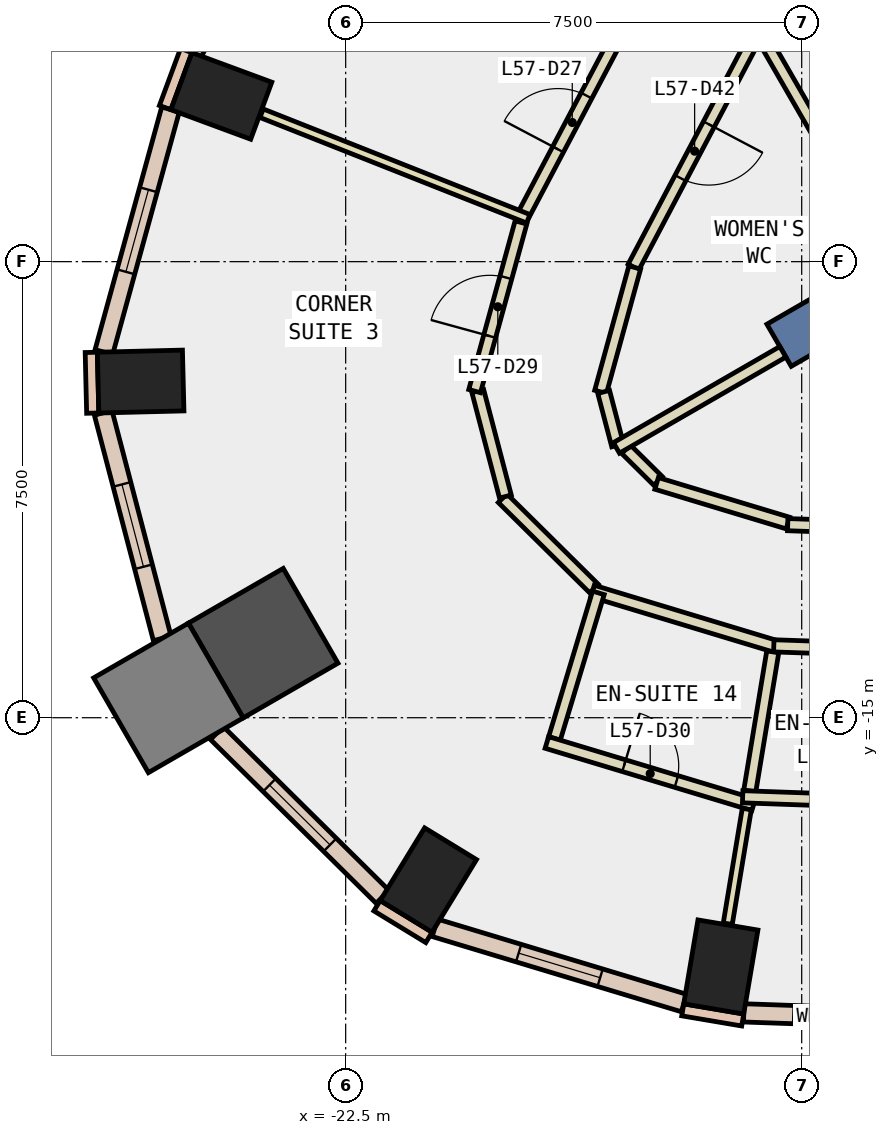
"""IFC4 building model, lengths in metres.
Left out: names, types, materials, properties, quantities, classifications, styles, units other than length and angle.
Written with IfcOpenShell. Run it as: python <this file> out.ifc"""

import sys

from ifc_helpers import new_model, si_unit, direction, frame, frame_2d, origin, origin_2d, place, context, subcontext, project, spatial, rectangle, extrude, element, fill, save


model = new_model("IFC4")
c1 = context("Model", 3, precision=1e-05, world=origin(), true_north=direction((0.0, 1.0)))
c2 = subcontext(c1, "Body", "Model", "MODEL_VIEW")
j1 = project(units=[si_unit("LENGTHUNIT", "METRE"), si_unit("PLANEANGLEUNIT", "RADIAN")], contexts=[c1])
p1 = place(None, origin())
s1 = spatial("IfcSite", under=j1, at=p1, CompositionType="ELEMENT")
p2 = place(p1, origin())
s2 = spatial("IfcBuilding", under=s1, at=p2, CompositionType="ELEMENT")
p3 = place(p2, frame((0.0, 0.0, 252.2)))
s3 = spatial("IfcBuildingStorey", under=s2, at=p3, CompositionType="ELEMENT", Elevation=252.2)
for number, where, z_axis, x_axis in (
    (1, (-16.33, -19.099, -0.34), (0.0, 0.0, 1.0), (-0.986, 0.167, 0.0)),
    (2, (-24.545, -4.775, -0.34), (0.0, 0.0, 1.0), (0.347, 0.938, 0.0)),
    (3, (-25.872, -9.472, -0.34), (0.0, 0.0, 1.0), (-0.025, 1.0, 0.0)),
):
    element("IfcColumn", number, at=place(p3, frame(where, z_axis=z_axis, x_axis=x_axis)), inside=s3, PredefinedType="COLUMN", context=c2, shape_type="SweptSolid", body=[
        extrude(rectangle(XDim=1.0, YDim=1.4, at=origin_2d()), origin(), (0.0, 0.0, 1.0), 3.6),
    ])
p4 = place(p3, frame((-23.856, -13.774, -0.34), z_axis=(0.0, 0.0, 1.0), x_axis=(0.866025403784, 0.5, 0.0)))
e4 = element("IfcColumn", 4, at=p4, inside=s3, PredefinedType="COLUMN", context=c2, shape_type="SweptSolid", body=[
    extrude(rectangle(XDim=1.8, YDim=1.8, at=origin_2d()), origin(), (0.0, 0.0, 1.0), 3.6),
])
p5 = place(p3, frame((-21.14, -17.67, -0.34), z_axis=(0.0, 0.0, 1.0), x_axis=(-0.853341581839, 0.521352227103, 0.0)))
e5 = element("IfcColumn", 5, at=p5, inside=s3, PredefinedType="COLUMN", context=c2, shape_type="SweptSolid", body=[
    extrude(rectangle(XDim=1.0, YDim=1.4, at=origin_2d()), origin(), (0.0, 0.0, 1.0), 3.6),
])
p6 = place(p3, frame((-25.415, -14.674, -0.34), z_axis=(0.0, 0.0, 1.0), x_axis=(0.866025403784, 0.5, 0.0)))
e6 = element("IfcColumn", 6, at=p6, inside=s3, PredefinedType="COLUMN", context=c2, shape_type="SweptSolid", body=[
    extrude(rectangle(XDim=1.8, YDim=1.8, at=origin_2d()), origin(), (0.0, 0.0, 1.0), 3.6),
])
p7 = place(p3, frame((-7.578, -4.375, -0.34), z_axis=(0.0, 0.0, 1.0), x_axis=(-0.866024315419, -0.5000018851, 0.0)))
e7 = element("IfcWall", 7, at=p7, inside=s3, PredefinedType="SHEAR", context=c2, shape_type="SweptSolid", body=[
    extrude(rectangle(XDim=9.0, YDim=0.8, at=frame_2d((4.5, 0.0))), origin(), (0.0, 0.0, 1.0), 3.6),
])
p8 = place(p3, frame((-25.122, -4.029, 0.0), z_axis=(0.0, 0.0, 1.0), x_axis=(-0.346892928577, -0.937904737222, 0.0)))
e8 = element("IfcWall", 8, at=p8, inside=s3, PredefinedType="STANDARD", context=c2, shape_type="SweptSolid", body=[
    extrude(rectangle(XDim=1.0, YDim=0.2, at=frame_2d((0.5, 0.0))), origin(), (0.0, 0.0, 1.0), 3.26),
])
p9 = place(p3, frame((-16.956, -19.804, 0.0), z_axis=(0.0, 0.0, 1.0), x_axis=(0.985961725342, -0.166971483074, 0.0)))
e9 = element("IfcWall", 9, at=p9, inside=s3, PredefinedType="STANDARD", context=c2, shape_type="SweptSolid", body=[
    extrude(rectangle(XDim=1.0, YDim=0.2, at=frame_2d((0.5, 0.0))), origin(), (0.0, 0.0, 1.0), 3.26),
])
p10 = place(p3, frame((-26.684, -8.992, 0.0), z_axis=(0.0, 0.0, 1.0), x_axis=(0.024186470916, -0.999707464524, 0.0)))
e10 = element("IfcWall", 10, at=p10, inside=s3, PredefinedType="STANDARD", context=c2, shape_type="SweptSolid", body=[
    extrude(rectangle(XDim=0.999, YDim=0.2, at=frame_2d((0.5, 0.0))), origin(), (0.0, 0.0, 1.0), 3.26),
])
p11 = place(p3, frame((-21.984, -18.092, 0.0), z_axis=(0.0, 0.0, 1.0), x_axis=(0.853679739553, -0.520798331677, 0.0)))
e11 = element("IfcWall", 11, at=p11, inside=s3, PredefinedType="STANDARD", context=c2, shape_type="SweptSolid", body=[
    extrude(rectangle(XDim=1.0, YDim=0.2, at=frame_2d((0.5, 0.0))), origin(), (0.0, 0.0, 1.0), 3.26),
])
p12 = place(p3, frame((-15.952, -19.854, 0.0), z_axis=(0.0, 0.0, 1.0), x_axis=(0.999387577449, -0.034992428331, 0.0)))
e12 = element("IfcWall", 12, at=p12, inside=s3, PredefinedType="STANDARD", context=c2, shape_type="SweptSolid", body=[
    extrude(rectangle(XDim=7.661, YDim=0.3, at=frame_2d((3.83, 0.0))), origin(), (0.0, 0.0, 1.0), 3.26),
])
p13 = place(p12, frame((0.815, 0.0, 0.9)))
e13 = element("IfcOpeningElement", 13, at=p13, cuts=e12, PredefinedType="OPENING", context=c2, shape_type="SweptSolid", body=[
    extrude(rectangle(XDim=2.2, YDim=2.0, at=frame_2d((1.1, 1.0))), frame((0.0, 0.16, 0.0), z_axis=(0.0, -1.0, 0.0), x_axis=(1.0, 0.0, 0.0)), (0.0, 0.0, 1.0), 0.32),
])
p14 = place(p12, frame((4.646, 0.0, 0.9)))
e14 = element("IfcOpeningElement", 14, at=p14, cuts=e12, PredefinedType="OPENING", context=c2, shape_type="SweptSolid", body=[
    extrude(rectangle(XDim=2.2, YDim=2.0, at=frame_2d((1.1, 1.0))), frame((0.0, 0.16, 0.0), z_axis=(0.0, -1.0, 0.0), x_axis=(1.0, 0.0, 0.0)), (0.0, 0.0, 1.0), 0.32),
])
p15 = place(p3, frame((-22.381, 0.916, 0.0), z_axis=(0.0, 0.0, 1.0), x_axis=(-0.466663589714, -0.884434900959, 0.0)))
e15 = element("IfcWall", 15, at=p15, inside=s3, PredefinedType="STANDARD", context=c2, shape_type="SweptSolid", body=[
    extrude(rectangle(XDim=5.638, YDim=0.3, at=frame_2d((2.819, 0.0))), origin(), (0.0, 0.0, 1.0), 3.26),
])
p16 = place(p15, frame((0.459, 0.0, 0.9)))
e16 = element("IfcOpeningElement", 16, at=p16, cuts=e15, PredefinedType="OPENING", context=c2, shape_type="SweptSolid", body=[
    extrude(rectangle(XDim=1.9, YDim=2.0, at=frame_2d((0.95, 1.0))), frame((0.0, 0.16, 0.0), z_axis=(0.0, -1.0, 0.0), x_axis=(1.0, 0.0, 0.0)), (0.0, 0.0, 1.0), 0.32),
])
p17 = place(p15, frame((3.278, 0.0, 0.9)))
e17 = element("IfcOpeningElement", 17, at=p17, cuts=e15, PredefinedType="OPENING", context=c2, shape_type="SweptSolid", body=[
    extrude(rectangle(XDim=1.9, YDim=2.0, at=frame_2d((0.95, 1.0))), frame((0.0, 0.16, 0.0), z_axis=(0.0, -1.0, 0.0), x_axis=(1.0, 0.0, 0.0)), (0.0, 0.0, 1.0), 0.32),
])
p18 = place(p3, frame((-25.381, -4.998, 0.0), z_axis=(0.0, 0.0, 1.0), x_axis=(-0.264924661919, -0.964269113633, 0.0)))
e18 = element("IfcWall", 18, at=p18, inside=s3, PredefinedType="STANDARD", context=c2, shape_type="SweptSolid", body=[
    extrude(rectangle(XDim=4.137, YDim=0.3, at=frame_2d((2.068, 0.0))), origin(), (0.0, 0.0, 1.0), 3.26),
])
p19 = place(p18, frame((1.368, 0.0, 0.9)))
e19 = element("IfcOpeningElement", 19, at=p19, cuts=e18, PredefinedType="OPENING", context=c2, shape_type="SweptSolid", body=[
    extrude(rectangle(XDim=1.4, YDim=2.0, at=frame_2d((0.7, 1.0))), frame((0.0, 0.16, 0.0), z_axis=(0.0, -1.0, 0.0), x_axis=(1.0, 0.0, 0.0)), (0.0, 0.0, 1.0), 0.32),
])
p20 = place(p3, frame((-26.488, -9.986, 0.0), z_axis=(0.0, 0.0, 1.0), x_axis=(0.253248721632, -0.967401201669, 0.0)))
e20 = element("IfcWall", 20, at=p20, inside=s3, PredefinedType="STANDARD", context=c2, shape_type="SweptSolid", body=[
    extrude(rectangle(XDim=3.834, YDim=0.3, at=frame_2d((1.917, 0.0))), origin(), (0.0, 0.0, 1.0), 3.26),
])
p21 = place(p20, frame((1.217, 0.0, 0.9)))
e21 = element("IfcOpeningElement", 21, at=p21, cuts=e20, PredefinedType="OPENING", context=c2, shape_type="SweptSolid", body=[
    extrude(rectangle(XDim=1.4, YDim=2.0, at=frame_2d((0.7, 1.0))), frame((0.0, 0.16, 0.0), z_axis=(0.0, -1.0, 0.0), x_axis=(1.0, 0.0, 0.0)), (0.0, 0.0, 1.0), 0.32),
])
p22 = place(p3, frame((-24.618, -15.252, 0.0), z_axis=(0.0, 0.0, 1.0), x_axis=(0.71110935557, -0.703081420904, 0.0)))
e22 = element("IfcWall", 22, at=p22, inside=s3, PredefinedType="STANDARD", context=c2, shape_type="SweptSolid", body=[
    extrude(rectangle(XDim=3.832, YDim=0.3, at=frame_2d((1.916, 0.0))), origin(), (0.0, 0.0, 1.0), 3.26),
])
p23 = place(p22, frame((1.216, 0.0, 0.9)))
e23 = element("IfcOpeningElement", 23, at=p23, cuts=e22, PredefinedType="OPENING", context=c2, shape_type="SweptSolid", body=[
    extrude(rectangle(XDim=1.4, YDim=2.0, at=frame_2d((0.7, 1.0))), frame((0.0, 0.16, 0.0), z_axis=(0.0, -1.0, 0.0), x_axis=(1.0, 0.0, 0.0)), (0.0, 0.0, 1.0), 0.32),
])
p24 = place(p3, frame((-21.034, -18.455, 0.0), z_axis=(0.0, 0.0, 1.0), x_axis=(0.957346168713, -0.288943442997, 0.0)))
e24 = element("IfcWall", 24, at=p24, inside=s3, PredefinedType="STANDARD", context=c2, shape_type="SweptSolid", body=[
    extrude(rectangle(XDim=4.281, YDim=0.3, at=frame_2d((2.14, 0.0))), origin(), (0.0, 0.0, 1.0), 3.26),
])
p25 = place(p24, frame((1.44, 0.0, 0.9)))
e25 = element("IfcOpeningElement", 25, at=p25, cuts=e24, PredefinedType="OPENING", context=c2, shape_type="SweptSolid", body=[
    extrude(rectangle(XDim=1.4, YDim=2.0, at=frame_2d((0.7, 1.0))), frame((0.0, 0.16, 0.0), z_axis=(0.0, -1.0, 0.0), x_axis=(1.0, 0.0, 0.0)), (0.0, 0.0, 1.0), 0.32),
])
p26 = place(p3, frame((-15.756, -3.779, 0.0), z_axis=(0.0, 0.0, 1.0), x_axis=(-0.46672043873, -0.884404902786, 0.0)))
e26 = element("IfcWall", 26, at=p26, inside=s3, PredefinedType="PARTITIONING", context=c2, shape_type="SweptSolid", body=[
    extrude(rectangle(XDim=4.307, YDim=0.2, at=frame_2d((2.153, 0.0))), origin(), (0.0, 0.0, 1.0), 3.26),
])
p27 = place(p26, frame((1.653, 0.0, 0.0)))
e27 = element("IfcOpeningElement", 27, at=p27, cuts=e26, PredefinedType="OPENING", context=c2, shape_type="SweptSolid", body=[
    extrude(rectangle(XDim=1.0, YDim=2.1, at=frame_2d((0.5, 1.05))), frame((0.0, 0.11, 0.0), z_axis=(0.0, -1.0, 0.0), x_axis=(1.0, 0.0, 0.0)), (0.0, 0.0, 1.0), 0.22),
])
p28 = place(p3, frame((-17.746, -7.596, 0.0), z_axis=(0.0, 0.0, 1.0), x_axis=(-0.264859637197, -0.96428697626, 0.0)))
e28 = element("IfcWall", 28, at=p28, inside=s3, PredefinedType="PARTITIONING", context=c2, shape_type="SweptSolid", body=[
    extrude(rectangle(XDim=2.122, YDim=0.2, at=frame_2d((1.061, 0.0))), origin(), (0.0, 0.0, 1.0), 3.26),
])
p29 = place(p3, frame((-18.257, -9.642, 0.0), z_axis=(0.0, 0.0, 1.0), x_axis=(0.253407342366, -0.967359663639, 0.0)))
e29 = element("IfcWall", 29, at=p29, inside=s3, PredefinedType="PARTITIONING", context=c2, shape_type="SweptSolid", body=[
    extrude(rectangle(XDim=0.907, YDim=0.2, at=frame_2d((0.454, 0.0))), origin(), (0.0, 0.0, 1.0), 3.26),
])
p30 = place(p3, frame((-17.89, -10.584, 0.0), z_axis=(0.0, 0.0, 1.0), x_axis=(0.711042348586, -0.70314918653, 0.0)))
e30 = element("IfcWall", 30, at=p30, inside=s3, PredefinedType="PARTITIONING", context=c2, shape_type="SweptSolid", body=[
    extrude(rectangle(XDim=0.742, YDim=0.2, at=frame_2d((0.371, 0.0))), origin(), (0.0, 0.0, 1.0), 3.26),
])
p31 = place(p3, frame((-17.386, -11.147, 0.0), z_axis=(0.0, 0.0, 1.0), x_axis=(0.957321496956, -0.289025174451, 0.0)))
e31 = element("IfcWall", 31, at=p31, inside=s3, PredefinedType="PARTITIONING", context=c2, shape_type="SweptSolid", body=[
    extrude(rectangle(XDim=2.256, YDim=0.2, at=frame_2d((1.128, 0.0))), origin(), (0.0, 0.0, 1.0), 3.26),
])
p32 = place(p3, frame((-15.23, -11.825, 0.0), z_axis=(0.0, 0.0, 1.0), x_axis=(0.999397560436, -0.0347061406, 0.0)))
e32 = element("IfcWall", 32, at=p32, inside=s3, PredefinedType="PARTITIONING", context=c2, shape_type="SweptSolid", body=[
    extrude(rectangle(XDim=4.207, YDim=0.2, at=frame_2d((2.103, 0.0))), origin(), (0.0, 0.0, 1.0), 3.26),
])
p33 = place(p32, frame((1.603, 0.0, 0.0)))
e33 = element("IfcOpeningElement", 33, at=p33, cuts=e32, PredefinedType="OPENING", context=c2, shape_type="SweptSolid", body=[
    extrude(rectangle(XDim=1.0, YDim=2.1, at=frame_2d((0.5, 1.05))), frame((0.0, 0.11, 0.0), z_axis=(0.0, -1.0, 0.0), x_axis=(1.0, 0.0, 0.0)), (0.0, 0.0, 1.0), 0.22),
])
p34 = place(p3, frame((-19.602, -6.781, 0.0), z_axis=(0.0, 0.0, 1.0), x_axis=(0.466827780692, 0.884348247679, 0.0)))
e34 = element("IfcWall", 34, at=p34, inside=s3, PredefinedType="PARTITIONING", context=c2, shape_type="SweptSolid", body=[
    extrude(rectangle(XDim=3.451, YDim=0.2, at=frame_2d((1.726, 0.0))), origin(), (0.0, 0.0, 1.0), 3.26),
])
p35 = place(p34, frame((1.275, 0.0, 0.0)))
e35 = element("IfcOpeningElement", 35, at=p35, cuts=e34, PredefinedType="OPENING", context=c2, shape_type="SweptSolid", body=[
    extrude(rectangle(XDim=1.0, YDim=2.1, at=frame_2d((0.5, 1.05))), frame((0.0, 0.11, 0.0), z_axis=(0.0, -1.0, 0.0), x_axis=(1.0, 0.0, 0.0)), (0.0, 0.0, 1.0), 0.22),
])
p36 = place(p3, frame((-18.415, -12.877, 0.0), z_axis=(0.0, 0.0, 1.0), x_axis=(-0.711078065077, 0.70311306727, 0.0)))
e36 = element("IfcWall", 36, at=p36, inside=s3, PredefinedType="PARTITIONING", context=c2, shape_type="SweptSolid", body=[
    extrude(rectangle(XDim=2.115, YDim=0.2, at=frame_2d((1.058, 0.0))), origin(), (0.0, 0.0, 1.0), 3.26),
])
p37 = place(p3, frame((-19.873, -11.363, 0.0), z_axis=(0.0, 0.0, 1.0), x_axis=(-0.253192482031, 0.967415922467, 0.0)))
e37 = element("IfcWall", 37, at=p37, inside=s3, PredefinedType="PARTITIONING", context=c2, shape_type="SweptSolid", body=[
    extrude(rectangle(XDim=1.792, YDim=0.2, at=frame_2d((0.896, 0.0))), origin(), (0.0, 0.0, 1.0), 3.26),
])
p38 = place(p3, frame((-20.379, -9.629, 0.0), z_axis=(0.0, 0.0, 1.0), x_axis=(0.26487636938, 0.964282380293, 0.0)))
e38 = element("IfcWall", 38, at=p38, inside=s3, PredefinedType="PARTITIONING", context=c2, shape_type="SweptSolid", body=[
    extrude(rectangle(XDim=2.877, YDim=0.2, at=frame_2d((1.438, 0.0))), origin(), (0.0, 0.0, 1.0), 3.26),
])
p39 = place(p38, frame((0.938, 0.0, 0.0)))
e39 = element("IfcOpeningElement", 39, at=p39, cuts=e38, PredefinedType="OPENING", context=c2, shape_type="SweptSolid", body=[
    extrude(rectangle(XDim=1.0, YDim=2.1, at=frame_2d((0.5, 1.05))), frame((0.0, 0.11, 0.0), z_axis=(0.0, -1.0, 0.0), x_axis=(1.0, 0.0, 0.0)), (0.0, 0.0, 1.0), 0.22),
])
p40 = place(p3, frame((-15.363, -13.847, 0.0), z_axis=(0.0, 0.0, 1.0), x_axis=(-0.957320969561, 0.289026921303, 0.0)))
e40 = element("IfcWall", 40, at=p40, inside=s3, PredefinedType="PARTITIONING", context=c2, shape_type="SweptSolid", body=[
    extrude(rectangle(XDim=3.214, YDim=0.2, at=frame_2d((1.607, 0.0))), origin(), (0.0, 0.0, 1.0), 3.26),
])
p41 = place(p3, frame((-12.961, -13.905, 0.0), z_axis=(0.0, 0.0, 1.0), x_axis=(-0.999395279268, 0.034771766949, 0.0)))
e41 = element("IfcWall", 41, at=p41, inside=s3, PredefinedType="PARTITIONING", context=c2, shape_type="SweptSolid", body=[
    extrude(rectangle(XDim=2.5, YDim=0.2, at=frame_2d((1.25, 0.0))), origin(), (0.0, 0.0, 1.0), 3.26),
])
p42 = place(p3, frame((-13.58, -7.379, 0.0), z_axis=(0.0, 0.0, 1.0), x_axis=(-0.499916403993, 0.866073662582, 0.0)))
e42 = element("IfcWall", 42, at=p42, inside=s3, PredefinedType="PARTITIONING", context=c2, shape_type="SweptSolid", body=[
    extrude(rectangle(XDim=4.359, YDim=0.2, at=frame_2d((2.179, 0.0))), origin(), (0.0, 0.0, 1.0), 3.26),
])
p43 = place(p3, frame((-15.31, -8.983, 0.0), z_axis=(0.0, 0.0, 1.0), x_axis=(-0.866047943894, -0.499960957353, 0.0)))
e43 = element("IfcWall", 43, at=p43, inside=s3, PredefinedType="PARTITIONING", context=c2, shape_type="SweptSolid", body=[
    extrude(rectangle(XDim=3.16, YDim=0.2, at=frame_2d((1.58, 0.0))), origin(), (0.0, 0.0, 1.0), 3.26),
])
p44 = place(p3, frame((-19.497, -6.795, 0.0), z_axis=(0.0, 0.0, 1.0), x_axis=(-0.929826906887, 0.367997178289, 0.0)))
e44 = element("IfcWall", 44, at=p44, inside=s3, PredefinedType="PARTITIONING", context=c2, shape_type="SweptSolid", body=[
    extrude(rectangle(XDim=4.717, YDim=0.15, at=frame_2d((2.358, 0.0))), origin(), (0.0, 0.0, 1.0), 3.26),
])
p45 = place(p3, frame((-18.344, -12.947, 0.0), z_axis=(0.0, 0.0, 1.0), x_axis=(-0.288709122303, -0.957416859419, 0.0)))
e45 = element("IfcWall", 45, at=p45, inside=s3, PredefinedType="PARTITIONING", context=c2, shape_type="SweptSolid", body=[
    extrude(rectangle(XDim=2.5, YDim=0.2, at=frame_2d((1.25, 0.0))), origin(), (0.0, 0.0, 1.0), 3.26),
])
p46 = place(p3, frame((-19.191, -15.407, 0.0), z_axis=(0.0, 0.0, 1.0), x_axis=(0.957443200759, -0.28862175476, 0.0)))
e46 = element("IfcWall", 46, at=p46, inside=s3, PredefinedType="PARTITIONING", context=c2, shape_type="SweptSolid", body=[
    extrude(rectangle(XDim=3.551, YDim=0.2, at=frame_2d((1.775, 0.0))), origin(), (0.0, 0.0, 1.0), 3.26),
])
p47 = place(p46, frame((1.325, 0.0, 0.0)))
e47 = element("IfcOpeningElement", 47, at=p47, cuts=e46, PredefinedType="OPENING", context=c2, shape_type="SweptSolid", body=[
    extrude(rectangle(XDim=0.9, YDim=2.1, at=frame_2d((0.45, 1.05))), frame((0.0, 0.11, 0.0), z_axis=(0.0, -1.0, 0.0), x_axis=(1.0, 0.0, 0.0)), (0.0, 0.0, 1.0), 0.22),
])
p48 = place(p3, frame((-15.903, -16.502, 0.0), z_axis=(0.0, 0.0, 1.0), x_axis=(-0.163715562906, -0.986507584594, 0.0)))
e48 = element("IfcWall", 48, at=p48, inside=s3, PredefinedType="PARTITIONING", context=c2, shape_type="SweptSolid", body=[
    extrude(rectangle(XDim=1.912, YDim=0.15, at=frame_2d((0.956, 0.0))), origin(), (0.0, 0.0, 1.0), 3.26),
])
p49 = place(p3, frame((-15.476, -13.917, 0.0), z_axis=(0.0, 0.0, 1.0), x_axis=(-0.162964805234, -0.986631882849, 0.0)))
e49 = element("IfcWall", 49, at=p49, inside=s3, PredefinedType="PARTITIONING", context=c2, shape_type="SweptSolid", body=[
    extrude(rectangle(XDim=2.319, YDim=0.2, at=frame_2d((1.16, 0.0))), origin(), (0.0, 0.0, 1.0), 3.26),
])
p50 = place(p3, frame((-15.971, -16.3, 0.0), z_axis=(0.0, 0.0, 1.0), x_axis=(0.999370791233, -0.035468600627, 0.0)))
e50 = element("IfcWall", 50, at=p50, inside=s3, PredefinedType="PARTITIONING", context=c2, shape_type="SweptSolid", body=[
    extrude(rectangle(XDim=3.125, YDim=0.2, at=frame_2d((1.562, 0.0))), origin(), (0.0, 0.0, 1.0), 3.26),
])
p51 = place(p50, frame((1.112, 0.0, 0.0)))
e51 = element("IfcOpeningElement", 51, at=p51, cuts=e50, PredefinedType="OPENING", context=c2, shape_type="SweptSolid", body=[
    extrude(rectangle(XDim=0.9, YDim=2.1, at=frame_2d((0.45, 1.05))), frame((0.0, 0.11, 0.0), z_axis=(0.0, -1.0, 0.0), x_axis=(1.0, 0.0, 0.0)), (0.0, 0.0, 1.0), 0.22),
])
p52 = place(p13, origin())
e52 = element("IfcWindow", 52, at=p52, inside=s3, PartitioningType="SINGLE_PANEL", PredefinedType="WINDOW", context=c2, shape_type="SweptSolid", body=[
    extrude(rectangle(XDim=2.2, YDim=2.0, at=frame_2d((1.1, 1.0))), frame((0.0, 0.03, 0.0), z_axis=(0.0, -1.0, 0.0), x_axis=(1.0, 0.0, 0.0)), (0.0, 0.0, 1.0), 0.06),
])
fill(e13, e52)
p53 = place(p19, origin())
e53 = element("IfcWindow", 53, at=p53, inside=s3, PartitioningType="SINGLE_PANEL", PredefinedType="WINDOW", context=c2, shape_type="SweptSolid", body=[
    extrude(rectangle(XDim=1.4, YDim=2.0, at=frame_2d((0.7, 1.0))), frame((0.0, 0.03, 0.0), z_axis=(0.0, -1.0, 0.0), x_axis=(1.0, 0.0, 0.0)), (0.0, 0.0, 1.0), 0.06),
])
fill(e19, e53)
p54 = place(p21, origin())
e54 = element("IfcWindow", 54, at=p54, inside=s3, PartitioningType="SINGLE_PANEL", PredefinedType="WINDOW", context=c2, shape_type="SweptSolid", body=[
    extrude(rectangle(XDim=1.4, YDim=2.0, at=frame_2d((0.7, 1.0))), frame((0.0, 0.03, 0.0), z_axis=(0.0, -1.0, 0.0), x_axis=(1.0, 0.0, 0.0)), (0.0, 0.0, 1.0), 0.06),
])
fill(e21, e54)
p55 = place(p23, origin())
e55 = element("IfcWindow", 55, at=p55, inside=s3, PartitioningType="SINGLE_PANEL", PredefinedType="WINDOW", context=c2, shape_type="SweptSolid", body=[
    extrude(rectangle(XDim=1.4, YDim=2.0, at=frame_2d((0.7, 1.0))), frame((0.0, 0.03, 0.0), z_axis=(0.0, -1.0, 0.0), x_axis=(1.0, 0.0, 0.0)), (0.0, 0.0, 1.0), 0.06),
])
fill(e23, e55)
p56 = place(p25, origin())
e56 = element("IfcWindow", 56, at=p56, inside=s3, PartitioningType="SINGLE_PANEL", PredefinedType="WINDOW", context=c2, shape_type="SweptSolid", body=[
    extrude(rectangle(XDim=1.4, YDim=2.0, at=frame_2d((0.7, 1.0))), frame((0.0, 0.03, 0.0), z_axis=(0.0, -1.0, 0.0), x_axis=(1.0, 0.0, 0.0)), (0.0, 0.0, 1.0), 0.06),
])
fill(e25, e56)
p57 = place(p35, origin())
e57 = element("IfcDoor", 57, at=p57, inside=s3, OperationType="SINGLE_SWING_LEFT", PredefinedType="DOOR", context=c2, shape_type="SweptSolid", body=[
    extrude(rectangle(XDim=1.0, YDim=2.1, at=frame_2d((0.5, 1.05))), frame((0.0, 0.025, 0.0), z_axis=(0.0, -1.0, 0.0), x_axis=(1.0, 0.0, 0.0)), (0.0, 0.0, 1.0), 0.05),
])
fill(e35, e57)
p58 = place(p39, origin())
e58 = element("IfcDoor", 58, at=p58, inside=s3, OperationType="SINGLE_SWING_LEFT", PredefinedType="DOOR", context=c2, shape_type="SweptSolid", body=[
    extrude(rectangle(XDim=1.0, YDim=2.1, at=frame_2d((0.5, 1.05))), frame((0.0, 0.025, 0.0), z_axis=(0.0, -1.0, 0.0), x_axis=(1.0, 0.0, 0.0)), (0.0, 0.0, 1.0), 0.05),
])
fill(e39, e58)
p59 = place(p47, origin())
e59 = element("IfcDoor", 59, at=p59, inside=s3, OperationType="SINGLE_SWING_LEFT", PredefinedType="DOOR", context=c2, shape_type="SweptSolid", body=[
    extrude(rectangle(XDim=0.9, YDim=2.1, at=frame_2d((0.45, 1.05))), frame((0.0, 0.025, 0.0), z_axis=(0.0, -1.0, 0.0), x_axis=(1.0, 0.0, 0.0)), (0.0, 0.0, 1.0), 0.05),
])
fill(e47, e59)
p60 = place(p27, origin())
e60 = element("IfcDoor", 60, at=p60, inside=s3, OperationType="SINGLE_SWING_LEFT", PredefinedType="DOOR", context=c2, shape_type="SweptSolid", body=[
    extrude(rectangle(XDim=1.0, YDim=2.1, at=frame_2d((0.5, 1.05))), frame((0.0, 0.025, 0.0), z_axis=(0.0, -1.0, 0.0), x_axis=(1.0, 0.0, 0.0)), (0.0, 0.0, 1.0), 0.05),
])
fill(e27, e60)
save(model, sys.argv[1])
